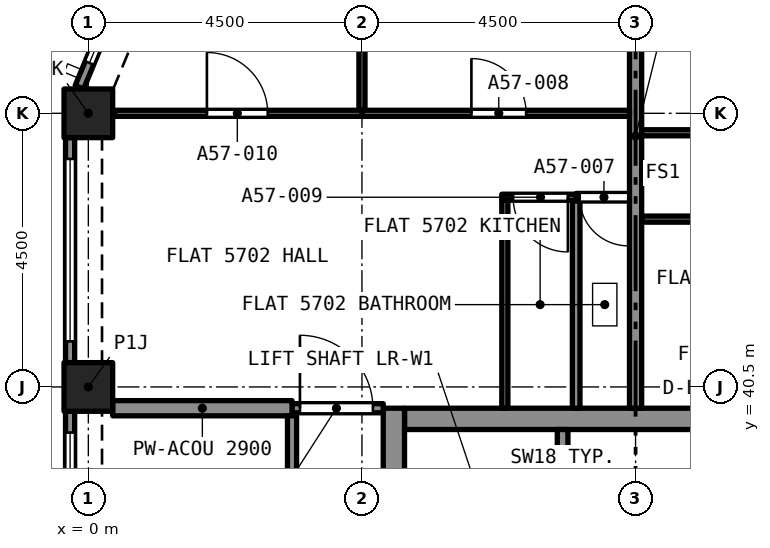
"""IFC4 building model, lengths in metres.
Left out: names, types, materials, properties, quantities, classifications, styles, units other than length and angle.
Written with IfcOpenShell. Run it as: python <this file> out.ifc"""

import sys

from ifc_helpers import new_model, si_unit, direction, frame, frame_2d, origin, origin_2d, place, context, subcontext, project, spatial, rectangle, extrude, element, fill, save


model = new_model("IFC4")
c1 = context("Model", 3, precision=1e-05, world=origin(), true_north=direction((0.0, 1.0)))
c2 = subcontext(c1, "Body", "Model", "MODEL_VIEW")
j1 = project(units=[si_unit("LENGTHUNIT", "METRE"), si_unit("PLANEANGLEUNIT", "RADIAN")], contexts=[c1])
p1 = place(None, origin())
s1 = spatial("IfcSite", under=j1, at=p1, CompositionType="ELEMENT")
p2 = place(p1, origin())
s2 = spatial("IfcBuilding", under=s1, at=p2, CompositionType="ELEMENT")
p3 = place(p2, frame((0.0, 0.0, 206.895)))
s3 = spatial("IfcBuildingStorey", under=s2, at=p3, CompositionType="ELEMENT", Elevation=206.895)
for number, where, z_axis, x_axis in (
    (1, (0.0, 40.5, 0.0), (0.0, 0.0, 1.0), (1.0, 0.0, 0.0)),
    (2, (0.0, 45.0, 0.0), (0.0, 0.0, 1.0), (1.0, 0.0, 0.0)),
):
    element("IfcColumn", number, at=place(p3, frame(where, z_axis=z_axis, x_axis=x_axis)), inside=s3, PredefinedType="COLUMN", context=c2, shape_type="SweptSolid", body=[
        extrude(rectangle(XDim=0.8, YDim=0.8, at=origin_2d()), origin(), (0.0, 0.0, 1.0), 3.2),
    ])
p4 = place(p3, frame((5.2, 39.975, 0.0), z_axis=(0.0, 0.0, 1.0), x_axis=(1.0, 0.0, 0.0)))
e3 = element("IfcWall", 3, at=p4, inside=s3, PredefinedType="SOLIDWALL", context=c2, shape_type="SweptSolid", body=[
    extrude(rectangle(XDim=7.6, YDim=0.35, at=frame_2d((3.8, 0.0))), origin(), (0.0, 0.0, 1.0), 3.2),
])
p5 = place(p3, frame((5.025, 27.35, 0.0), z_axis=(0.0, 0.0, 1.0), x_axis=(0.0, 1.0, 0.0)))
e4 = element("IfcWall", 4, at=p5, inside=s3, PredefinedType="SOLIDWALL", context=c2, shape_type="SweptSolid", body=[
    extrude(rectangle(XDim=12.8, YDim=0.35, at=frame_2d((6.4, 0.0))), origin(), (0.0, 0.0, 1.0), 3.2),
])
p6 = place(p5, frame((8.6, 0.0, 0.0)))
e5 = element("IfcOpeningElement", 5, at=p6, cuts=e4, PredefinedType="OPENING", context=c2, shape_type="SweptSolid", body=[
    extrude(rectangle(XDim=1.2, YDim=2.1, at=frame_2d((0.6, 1.05))), frame((0.0, 0.185, 0.0), z_axis=(0.0, -1.0, 0.0), x_axis=(1.0, 0.0, 0.0)), (0.0, 0.0, 1.0), 0.37),
])
p7 = place(p3, frame((-0.147, 45.429, 0.0), z_axis=(0.0, 0.0, 1.0), x_axis=(0.382669406082, 0.923885342263, 0.0)))
e6 = element("IfcWall", 6, at=p7, inside=s3, PredefinedType="SOLIDWALL", context=c2, shape_type="SweptSolid", body=[
    extrude(rectangle(XDim=2.602, YDim=0.15, at=frame_2d((1.301, 0.0))), origin(), (0.0, 0.0, 1.0), 3.2),
])
p8 = place(p7, frame((0.432, 0.0, 0.45)))
e7 = element("IfcOpeningElement", 7, at=p8, cuts=e6, PredefinedType="OPENING", context=c2, shape_type="SweptSolid", body=[
    extrude(rectangle(XDim=1.9, YDim=1.95, at=frame_2d((0.95, 0.975))), frame((0.0, 0.085, 0.0), z_axis=(0.0, -1.0, 0.0), x_axis=(1.0, 0.0, 0.0)), (0.0, 0.0, 1.0), 0.17),
])
p9 = place(p3, frame((-0.3, 40.9, 0.0), z_axis=(0.0, 0.0, 1.0), x_axis=(0.0, 1.0, 0.0)))
e8 = element("IfcWall", 8, at=p9, inside=s3, PredefinedType="SOLIDWALL", context=c2, shape_type="SweptSolid", body=[
    extrude(rectangle(XDim=3.7, YDim=0.15, at=frame_2d((1.85, 0.0))), origin(), (0.0, 0.0, 1.0), 3.2),
])
p10 = place(p9, frame((0.35, 0.0, 0.45)))
e9 = element("IfcOpeningElement", 9, at=p10, cuts=e8, PredefinedType="OPENING", context=c2, shape_type="SweptSolid", body=[
    extrude(rectangle(XDim=3.0, YDim=1.95, at=frame_2d((1.5, 0.975))), frame((0.0, 0.085, 0.0), z_axis=(0.0, -1.0, 0.0), x_axis=(1.0, 0.0, 0.0)), (0.0, 0.0, 1.0), 0.17),
])
p11 = place(p3, frame((-0.3, 36.4, 0.0), z_axis=(0.0, 0.0, 1.0), x_axis=(0.0, 1.0, 0.0)))
e10 = element("IfcWall", 10, at=p11, inside=s3, PredefinedType="SOLIDWALL", context=c2, shape_type="SweptSolid", body=[
    extrude(rectangle(XDim=3.7, YDim=0.15, at=frame_2d((1.85, 0.0))), origin(), (0.0, 0.0, 1.0), 3.2),
])
p12 = place(p11, frame((0.35, 0.0, 0.45)))
e11 = element("IfcOpeningElement", 11, at=p12, cuts=e10, PredefinedType="OPENING", context=c2, shape_type="SweptSolid", body=[
    extrude(rectangle(XDim=3.0, YDim=1.95, at=frame_2d((1.5, 0.975))), frame((0.0, 0.085, 0.0), z_axis=(0.0, -1.0, 0.0), x_axis=(1.0, 0.0, 0.0)), (0.0, 0.0, 1.0), 0.17),
])
p13 = place(p3, frame((8.9, 43.62, 0.0), z_axis=(0.0, 0.0, 1.0), x_axis=(-1.0, 0.0, 0.0)))
e12 = element("IfcWall", 12, at=p13, inside=s3, PredefinedType="PARTITIONING", context=c2, shape_type="SweptSolid", body=[
    extrude(rectangle(XDim=0.877, YDim=0.125, at=frame_2d((0.438, 0.0))), origin(), (0.0, 0.0, 1.0), 2.9),
])
p14 = place(p13, frame((0.02, 0.0, 0.0)))
e13 = element("IfcOpeningElement", 13, at=p14, cuts=e12, PredefinedType="OPENING", context=c2, shape_type="SweptSolid", body=[
    extrude(rectangle(XDim=0.8, YDim=2.1, at=frame_2d((0.4, 1.05))), frame((0.0, 0.073, 0.0), z_axis=(0.0, -1.0, 0.0), x_axis=(1.0, 0.0, 0.0)), (0.0, 0.0, 1.0), 0.145),
])
p15 = place(p3, frame((8.023, 40.15, 0.0), z_axis=(0.0, 0.0, 1.0), x_axis=(0.0, 1.0, 0.0)))
e14 = element("IfcWall", 14, at=p15, inside=s3, PredefinedType="PARTITIONING", context=c2, shape_type="SweptSolid", body=[
    extrude(rectangle(XDim=3.408, YDim=0.125, at=frame_2d((1.704, 0.0))), origin(), (0.0, 0.0, 1.0), 2.9),
])
p16 = place(p3, frame((9.0, 40.15, 0.0), z_axis=(0.0, 0.0, 1.0), x_axis=(0.0, 1.0, 0.0)))
e15 = element("IfcWall", 15, at=p16, inside=s3, PredefinedType="PARTITIONING", context=c2, shape_type="SweptSolid", body=[
    extrude(rectangle(XDim=8.95, YDim=0.2, at=frame_2d((4.475, 0.0))), origin(), (0.0, 0.0, 1.0), 2.9),
])
p17 = place(p3, frame((4.5, 45.0, 0.0), z_axis=(0.0, 0.0, 1.0), x_axis=(1.0, 0.0, 0.0)))
e16 = element("IfcWall", 16, at=p17, inside=s3, PredefinedType="PARTITIONING", context=c2, shape_type="SweptSolid", body=[
    extrude(rectangle(XDim=4.4, YDim=0.1, at=frame_2d((2.2, 0.0))), origin(), (0.0, 0.0, 1.0), 2.9),
])
p18 = place(p17, frame((1.8, 0.0, 0.0)))
e17 = element("IfcOpeningElement", 17, at=p18, cuts=e16, PredefinedType="OPENING", context=c2, shape_type="SweptSolid", body=[
    extrude(rectangle(XDim=0.9, YDim=2.1, at=frame_2d((0.45, 1.05))), frame((0.0, 0.06, 0.0), z_axis=(0.0, -1.0, 0.0), x_axis=(1.0, 0.0, 0.0)), (0.0, 0.0, 1.0), 0.12),
])
p19 = place(p3, frame((4.5, 45.05, 0.0), z_axis=(0.0, 0.0, 1.0), x_axis=(0.0, 1.0, 0.0)))
e18 = element("IfcWall", 18, at=p19, inside=s3, PredefinedType="PARTITIONING", context=c2, shape_type="SweptSolid", body=[
    extrude(rectangle(XDim=4.017, YDim=0.1, at=frame_2d((2.009, 0.0))), origin(), (0.0, 0.0, 1.0), 2.9),
])
p20 = place(p3, frame((8.023, 43.62, 0.0), z_axis=(0.0, 0.0, 1.0), x_axis=(-1.0, 0.0, 0.0)))
e19 = element("IfcWall", 19, at=p20, inside=s3, PredefinedType="PARTITIONING", context=c2, shape_type="SweptSolid", body=[
    extrude(rectangle(XDim=1.223, YDim=0.1, at=frame_2d((0.611, 0.0))), origin(), (0.0, 0.0, 1.0), 2.9),
])
p21 = place(p20, frame((0.136, 0.0, 0.0)))
e20 = element("IfcOpeningElement", 20, at=p21, cuts=e19, PredefinedType="OPENING", context=c2, shape_type="SweptSolid", body=[
    extrude(rectangle(XDim=0.9, YDim=2.1, at=frame_2d((0.45, 1.05))), frame((0.0, 0.06, 0.0), z_axis=(0.0, -1.0, 0.0), x_axis=(1.0, 0.0, 0.0)), (0.0, 0.0, 1.0), 0.12),
])
p22 = place(p3, frame((6.85, 40.15, 0.0), z_axis=(0.0, 0.0, 1.0), x_axis=(0.0, 1.0, 0.0)))
e21 = element("IfcWall", 21, at=p22, inside=s3, PredefinedType="PARTITIONING", context=c2, shape_type="SweptSolid", body=[
    extrude(rectangle(XDim=3.42, YDim=0.1, at=frame_2d((1.71, 0.0))), origin(), (0.0, 0.0, 1.0), 2.9),
])
p23 = place(p3, frame((0.433, 45.0, 0.0), z_axis=(0.0, 0.0, 1.0), x_axis=(1.0, 0.0, 0.0)))
e22 = element("IfcWall", 22, at=p23, inside=s3, PredefinedType="PARTITIONING", context=c2, shape_type="SweptSolid", body=[
    extrude(rectangle(XDim=4.067, YDim=0.1, at=frame_2d((2.034, 0.0))), origin(), (0.0, 0.0, 1.0), 2.9),
])
p24 = place(p23, frame((1.517, 0.0, 0.0)))
e23 = element("IfcOpeningElement", 23, at=p24, cuts=e22, PredefinedType="OPENING", context=c2, shape_type="SweptSolid", body=[
    extrude(rectangle(XDim=1.0, YDim=2.1, at=frame_2d((0.5, 1.05))), frame((0.0, 0.06, 0.0), z_axis=(0.0, -1.0, 0.0), x_axis=(1.0, 0.0, 0.0)), (0.0, 0.0, 1.0), 0.12),
])
p25 = place(p3, frame((3.35, 40.15, 0.0), z_axis=(0.0, 0.0, 1.0), x_axis=(1.0, 0.0, 0.0)))
e24 = element("IfcWall", 24, at=p25, inside=s3, PredefinedType="PARTITIONING", context=c2, shape_type="SweptSolid", body=[
    extrude(rectangle(XDim=1.5, YDim=0.15, at=frame_2d((0.75, 0.0))), origin(), (0.0, 0.0, 1.0), 2.9),
])
p26 = place(p25, frame((0.13, 0.0, 0.0)))
e25 = element("IfcOpeningElement", 25, at=p26, cuts=e24, PredefinedType="OPENING", context=c2, shape_type="SweptSolid", body=[
    extrude(rectangle(XDim=1.2, YDim=2.4, at=frame_2d((0.6, 1.2))), frame((0.0, 0.085, 0.0), z_axis=(0.0, -1.0, 0.0), x_axis=(1.0, 0.0, 0.0)), (0.0, 0.0, 1.0), 0.17),
])
p27 = place(p3, frame((0.4, 40.15, 0.0), z_axis=(0.0, 0.0, 1.0), x_axis=(1.0, 0.0, 0.0)))
e26 = element("IfcWall", 26, at=p27, inside=s3, PredefinedType="PARTITIONING", context=c2, shape_type="SweptSolid", body=[
    extrude(rectangle(XDim=2.95, YDim=0.25, at=frame_2d((1.475, 0.0))), origin(), (0.0, 0.0, 1.0), 2.9),
])
p28 = place(p3, frame((12.201, 43.26, 0.0), z_axis=(0.0, 0.0, 1.0), x_axis=(-1.0, 0.0, 0.0)))
e27 = element("IfcWall", 27, at=p28, inside=s3, PredefinedType="PARTITIONING", context=c2, shape_type="SweptSolid", body=[
    extrude(rectangle(XDim=3.101, YDim=0.1, at=frame_2d((1.55, 0.0))), origin(), (0.0, 0.0, 1.0), 2.9),
])
p29 = place(p28, frame((1.15, 0.0, 0.0)))
e28 = element("IfcOpeningElement", 28, at=p29, cuts=e27, PredefinedType="OPENING", context=c2, shape_type="SweptSolid", body=[
    extrude(rectangle(XDim=0.9, YDim=2.1, at=frame_2d((0.45, 1.05))), frame((0.0, 0.06, 0.0), z_axis=(0.0, -1.0, 0.0), x_axis=(1.0, 0.0, 0.0)), (0.0, 0.0, 1.0), 0.12),
])
p30 = place(p3, frame((9.1, 44.68, 0.0), z_axis=(0.0, 0.0, 1.0), x_axis=(1.0, 0.0, 0.0)))
e29 = element("IfcWall", 29, at=p30, inside=s3, PredefinedType="PARTITIONING", context=c2, shape_type="SweptSolid", body=[
    extrude(rectangle(XDim=4.4, YDim=0.1, at=frame_2d((2.2, 0.0))), origin(), (0.0, 0.0, 1.0), 2.9),
])
p31 = place(p30, frame((1.65, 0.0, 0.0)))
e30 = element("IfcOpeningElement", 30, at=p31, cuts=e29, PredefinedType="OPENING", context=c2, shape_type="SweptSolid", body=[
    extrude(rectangle(XDim=1.0, YDim=2.1, at=frame_2d((0.5, 1.05))), frame((0.0, 0.06, 0.0), z_axis=(0.0, -1.0, 0.0), x_axis=(1.0, 0.0, 0.0)), (0.0, 0.0, 1.0), 0.12),
])
p32 = place(p3, frame((3.35, 31.5, 0.0), z_axis=(0.0, 0.0, 1.0), x_axis=(0.0, 1.0, 0.0)))
e31 = element("IfcWall", 31, at=p32, inside=s3, PredefinedType="PARTITIONING", context=c2, shape_type="SweptSolid", body=[
    extrude(rectangle(XDim=8.525, YDim=0.15, at=frame_2d((4.262, 0.0))), origin(), (0.0, 0.0, 1.0), 2.9),
])
p33 = place(p32, frame((3.825, 0.0, 0.0)))
e32 = element("IfcOpeningElement", 32, at=p33, cuts=e31, PredefinedType="OPENING", context=c2, shape_type="SweptSolid", body=[
    extrude(rectangle(XDim=1.0, YDim=2.1, at=frame_2d((0.5, 1.05))), frame((0.0, 0.085, 0.0), z_axis=(0.0, -1.0, 0.0), x_axis=(1.0, 0.0, 0.0)), (0.0, 0.0, 1.0), 0.17),
])
p34 = place(p3, frame((7.8, 37.5, 0.0), z_axis=(0.0, 0.0, 1.0), x_axis=(0.0, 1.0, 0.0)))
e33 = element("IfcWall", 33, at=p34, inside=s3, PredefinedType="SOLIDWALL", context=c2, shape_type="SweptSolid", body=[
    extrude(rectangle(XDim=2.3, YDim=0.175, at=frame_2d((1.15, 0.0))), origin(), (0.0, 0.0, 1.0), 2.9),
])
p35 = place(p8, origin())
e34 = element("IfcWindow", 34, at=p35, inside=s3, PartitioningType="SINGLE_PANEL", PredefinedType="WINDOW", context=c2, shape_type="SweptSolid", body=[
    extrude(rectangle(XDim=1.9, YDim=1.95, at=frame_2d((0.95, 0.975))), frame((0.0, 0.03, 0.0), z_axis=(0.0, -1.0, 0.0), x_axis=(1.0, 0.0, 0.0)), (0.0, 0.0, 1.0), 0.06),
])
fill(e7, e34)
p36 = place(p10, origin())
e35 = element("IfcWindow", 35, at=p36, inside=s3, PartitioningType="SINGLE_PANEL", PredefinedType="WINDOW", context=c2, shape_type="SweptSolid", body=[
    extrude(rectangle(XDim=3.0, YDim=1.95, at=frame_2d((1.5, 0.975))), frame((0.0, 0.03, 0.0), z_axis=(0.0, -1.0, 0.0), x_axis=(1.0, 0.0, 0.0)), (0.0, 0.0, 1.0), 0.06),
])
fill(e9, e35)
p37 = place(p12, origin())
e36 = element("IfcWindow", 36, at=p37, inside=s3, PartitioningType="SINGLE_PANEL", PredefinedType="WINDOW", context=c2, shape_type="SweptSolid", body=[
    extrude(rectangle(XDim=3.0, YDim=1.95, at=frame_2d((1.5, 0.975))), frame((0.0, 0.03, 0.0), z_axis=(0.0, -1.0, 0.0), x_axis=(1.0, 0.0, 0.0)), (0.0, 0.0, 1.0), 0.06),
])
fill(e11, e36)
p38 = place(p14, origin())
e37 = element("IfcDoor", 37, at=p38, inside=s3, OperationType="SINGLE_SWING_LEFT", PredefinedType="DOOR", context=c2, shape_type="SweptSolid", body=[
    extrude(rectangle(XDim=0.8, YDim=2.1, at=frame_2d((0.4, 1.05))), frame((0.0, 0.025, 0.0), z_axis=(0.0, -1.0, 0.0), x_axis=(1.0, 0.0, 0.0)), (0.0, 0.0, 1.0), 0.05),
])
fill(e13, e37)
p39 = place(p18, origin())
e38 = element("IfcDoor", 38, at=p39, inside=s3, OperationType="SINGLE_SWING_RIGHT", PredefinedType="DOOR", context=c2, shape_type="SweptSolid", body=[
    extrude(rectangle(XDim=0.9, YDim=2.1, at=frame_2d((0.45, 1.05))), frame((0.0, 0.025, 0.0), z_axis=(0.0, -1.0, 0.0), x_axis=(1.0, 0.0, 0.0)), (0.0, 0.0, 1.0), 0.05),
])
fill(e17, e38)
p40 = place(p21, origin())
e39 = element("IfcDoor", 39, at=p40, inside=s3, OperationType="SINGLE_SWING_LEFT", PredefinedType="DOOR", context=c2, shape_type="SweptSolid", body=[
    extrude(rectangle(XDim=0.9, YDim=2.1, at=frame_2d((0.45, 1.05))), frame((0.0, 0.025, 0.0), z_axis=(0.0, -1.0, 0.0), x_axis=(1.0, 0.0, 0.0)), (0.0, 0.0, 1.0), 0.05),
])
fill(e20, e39)
p41 = place(p24, origin())
e40 = element("IfcDoor", 40, at=p41, inside=s3, OperationType="SINGLE_SWING_LEFT", PredefinedType="DOOR", context=c2, shape_type="SweptSolid", body=[
    extrude(rectangle(XDim=1.0, YDim=2.1, at=frame_2d((0.5, 1.05))), frame((0.0, 0.025, 0.0), z_axis=(0.0, -1.0, 0.0), x_axis=(1.0, 0.0, 0.0)), (0.0, 0.0, 1.0), 0.05),
])
fill(e23, e40)
p42 = place(p26, origin())
e41 = element("IfcDoor", 41, at=p42, inside=s3, OperationType="SINGLE_SWING_LEFT", PredefinedType="DOOR", context=c2, shape_type="SweptSolid", body=[
    extrude(rectangle(XDim=1.2, YDim=2.4, at=frame_2d((0.6, 1.2))), frame((0.0, 0.025, 0.0), z_axis=(0.0, -1.0, 0.0), x_axis=(1.0, 0.0, 0.0)), (0.0, 0.0, 1.0), 0.05),
])
fill(e25, e41)
save(model, sys.argv[1])
